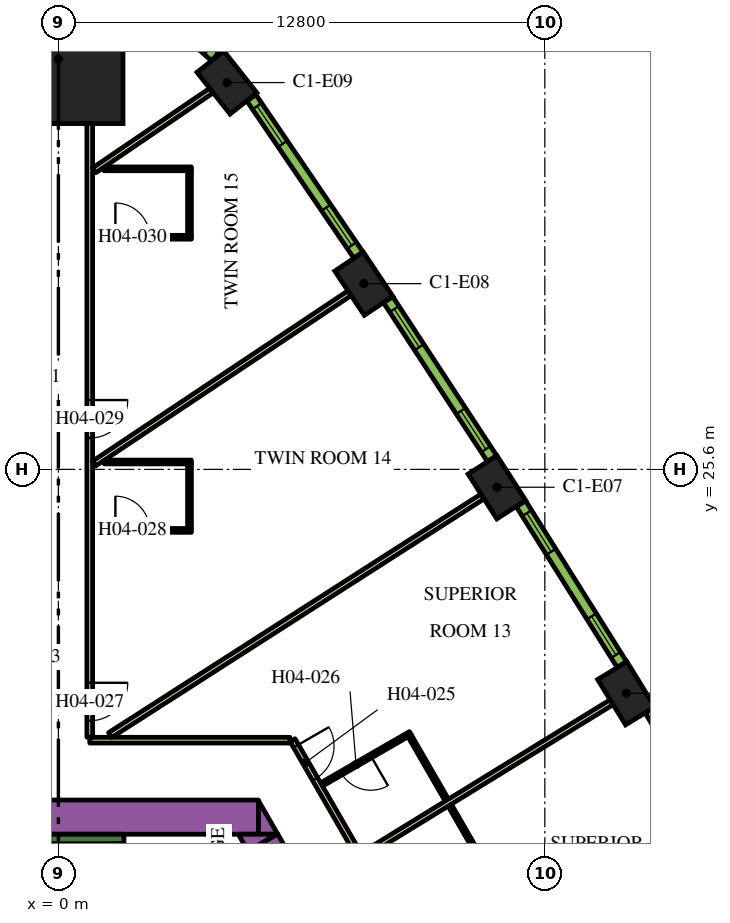
"""IFC4 building model, lengths in metres.
Left out: names, types, materials, properties, quantities, classifications, styles, units other than length and angle.
Written with IfcOpenShell. Run it as: python <this file> out.ifc"""

import sys

from ifc_helpers import new_model, si_unit, direction, frame, frame_2d, origin, origin_2d, place, context, subcontext, project, spatial, polyline, rectangle, outline, extrude, element, fill, save


model = new_model("IFC4")
c1 = context("Model", 3, precision=1e-05, world=origin(), true_north=direction((0.0, 1.0)))
c2 = subcontext(c1, "Body", "Model", "MODEL_VIEW")
j1 = project(units=[si_unit("LENGTHUNIT", "METRE"), si_unit("PLANEANGLEUNIT", "RADIAN")], contexts=[c1])
p1 = place(None, origin())
s1 = spatial("IfcSite", under=j1, at=p1, CompositionType="ELEMENT")
p2 = place(p1, origin())
s2 = spatial("IfcBuilding", under=s1, at=p2, CompositionType="ELEMENT")
p3 = place(p2, frame((0.0, 0.0, 62.7)))
s3 = spatial("IfcBuildingStorey", under=s2, at=p3, CompositionType="ELEMENT", Elevation=62.7)
p4 = place(p3, frame((0.0, 36.399, 0.0), z_axis=(0.0, 0.0, 1.0), x_axis=(0.0, 1.0, 0.0)))
e1 = element("IfcColumn", 1, at=p4, inside=s3, PredefinedType="COLUMN", context=c2, shape_type="SweptSolid", body=[
    extrude(rectangle(XDim=3.4, YDim=3.4, at=origin_2d()), origin(), (0.0, 0.0, 1.0), 3.9),
])
for number, where, z_axis, x_axis in (
    (2, (14.942, 19.71, 0.0), (0.0, 0.0, 1.0), (-0.524, 0.852, 0.0)),
    (3, (11.539, 25.131, 0.0), (0.0, 0.0, 1.0), (-0.539, 0.842, 0.0)),
    (4, (8.037, 30.487, 0.0), (0.0, 0.0, 1.0), (-0.555, 0.832, 0.0)),
    (5, (4.436, 35.778, 0.0), (0.0, 0.0, 1.0), (-0.62, 0.784, 0.0)),
):
    element("IfcColumn", number, at=place(p3, frame(where, z_axis=z_axis, x_axis=x_axis)), inside=s3, PredefinedType="COLUMN", context=c2, shape_type="SweptSolid", body=[
        extrude(rectangle(XDim=1.4, YDim=0.9, at=origin_2d()), origin(), (0.0, 0.0, 1.0), 3.9),
    ])
p5 = place(p3, frame((-4.224, 16.45, 0.0), z_axis=(0.0, 0.0, 1.0), x_axis=(1.0, 0.0, 0.0)))
e6 = element("IfcWall", 6, at=p5, inside=s3, PredefinedType="SOLIDWALL", context=c2, shape_type="SweptSolid", body=[
    extrude(rectangle(XDim=9.488, YDim=0.9, at=frame_2d((4.744, 0.0))), origin(), (0.0, 0.0, 1.0), 3.9),
])
p6 = place(p3, origin())
e7 = element("IfcWall", 7, at=p6, inside=s3, PredefinedType="SOLIDWALL", context=c2, shape_type="SweptSolid", body=[
    extrude(outline(polyline([(5.265, 16.0), (5.265, 16.88), (5.773, 16.0), (5.265, 16.0)])), origin(), (0.0, 0.0, 1.0), 3.9),
])
p7 = place(p3, frame((5.926, 14.836, 0.0), z_axis=(0.0, 0.0, 1.0), x_axis=(-0.500076735116, 0.865981096212, 0.0)))
e8 = element("IfcWall", 8, at=p7, inside=s3, PredefinedType="SOLIDWALL", context=c2, shape_type="SweptSolid", body=[
    extrude(rectangle(XDim=1.094, YDim=0.9, at=frame_2d((0.547, 0.0))), origin(), (0.0, 0.0, 1.0), 3.9),
])
e9 = element("IfcWall", 9, at=p6, inside=s3, PredefinedType="SOLIDWALL", context=c2, shape_type="SweptSolid", body=[
    extrude(outline(polyline([(4.734, 16.0), (5.75, 16.0), (4.988, 15.56), (4.734, 16.0)])), origin(), (0.0, 0.0, 1.0), 3.9),
])
p8 = place(p3, frame((-1.725, 15.875, 0.0), z_axis=(0.0, 0.0, 1.0), x_axis=(1.0, 0.0, 0.0)))
e10 = element("IfcWall", 10, at=p8, inside=s3, PredefinedType="SOLIDWALL", context=c2, shape_type="SweptSolid", body=[
    extrude(rectangle(XDim=3.45, YDim=0.25, at=frame_2d((1.725, 0.0))), origin(), (0.0, 0.0, 1.0), 3.9),
])
p9 = place(p3, frame((6.163, 18.475, 0.0), z_axis=(0.0, 0.0, 1.0), x_axis=(0.500001317485, -0.866024643133, 0.0)))
e11 = element("IfcWall", 11, at=p9, inside=s3, PredefinedType="PARTITIONING", context=c2, shape_type="SweptSolid", body=[
    extrude(rectangle(XDim=25.767, YDim=0.15, at=frame_2d((12.883, 0.0))), origin(), (0.0, 0.0, 1.0), 2.75),
])
p10 = place(p9, frame((21.138, 0.0, 0.0)))
e12 = element("IfcOpeningElement", 12, at=p10, cuts=e11, PredefinedType="OPENING", context=c2, shape_type="SweptSolid", body=[
    extrude(rectangle(XDim=1.0, YDim=2.1, at=frame_2d((0.5, 1.05))), frame((0.0, 0.085, 0.0), z_axis=(0.0, -1.0, 0.0), x_axis=(1.0, 0.0, 0.0)), (0.0, 0.0, 1.0), 0.17),
])
p11 = place(p9, frame((9.948, 0.0, 0.0)))
e13 = element("IfcOpeningElement", 13, at=p11, cuts=e11, PredefinedType="OPENING", context=c2, shape_type="SweptSolid", body=[
    extrude(rectangle(XDim=1.1, YDim=2.1, at=frame_2d((0.55, 1.05))), frame((0.0, 0.085, 0.0), z_axis=(0.0, -1.0, 0.0), x_axis=(1.0, 0.0, 0.0)), (0.0, 0.0, 1.0), 0.17),
])
p12 = place(p9, frame((8.641, 0.0, 0.0)))
e14 = element("IfcOpeningElement", 14, at=p12, cuts=e11, PredefinedType="OPENING", context=c2, shape_type="SweptSolid", body=[
    extrude(rectangle(XDim=1.0, YDim=2.1, at=frame_2d((0.5, 1.05))), frame((0.0, 0.085, 0.0), z_axis=(0.0, -1.0, 0.0), x_axis=(1.0, 0.0, 0.0)), (0.0, 0.0, 1.0), 0.17),
])
p13 = place(p9, frame((0.18, 0.0, 0.0)))
e15 = element("IfcOpeningElement", 15, at=p13, cuts=e11, PredefinedType="OPENING", context=c2, shape_type="SweptSolid", body=[
    extrude(rectangle(XDim=1.0, YDim=2.1, at=frame_2d((0.5, 1.05))), frame((0.0, 0.085, 0.0), z_axis=(0.0, -1.0, 0.0), x_axis=(1.0, 0.0, 0.0)), (0.0, 0.0, 1.0), 0.17),
])
p14 = place(p3, frame((0.825, 18.475, 0.0), z_axis=(0.0, 0.0, 1.0), x_axis=(1.0, 0.0, 0.0)))
e16 = element("IfcWall", 16, at=p14, inside=s3, PredefinedType="PARTITIONING", context=c2, shape_type="SweptSolid", body=[
    extrude(rectangle(XDim=5.268, YDim=0.15, at=frame_2d((2.634, 0.0))), origin(), (0.0, 0.0, 1.0), 2.75),
])
p15 = place(p3, frame((0.825, 34.699, 0.0), z_axis=(0.0, 0.0, 1.0), x_axis=(0.0, -1.0, 0.0)))
e17 = element("IfcWall", 17, at=p15, inside=s3, PredefinedType="PARTITIONING", context=c2, shape_type="SweptSolid", body=[
    extrude(rectangle(XDim=16.144, YDim=0.15, at=frame_2d((8.072, 0.0))), origin(), (0.0, 0.0, 1.0), 2.75),
])
p16 = place(p15, frame((14.714, 0.0, 0.0)))
e18 = element("IfcOpeningElement", 18, at=p16, cuts=e17, PredefinedType="OPENING", context=c2, shape_type="SweptSolid", body=[
    extrude(rectangle(XDim=1.0, YDim=2.1, at=frame_2d((0.5, 1.05))), frame((0.0, 0.085, 0.0), z_axis=(0.0, -1.0, 0.0), x_axis=(1.0, 0.0, 0.0)), (0.0, 0.0, 1.0), 0.17),
])
p17 = place(p15, frame((7.275, 0.0, 0.0)))
e19 = element("IfcOpeningElement", 19, at=p17, cuts=e17, PredefinedType="OPENING", context=c2, shape_type="SweptSolid", body=[
    extrude(rectangle(XDim=1.0, YDim=2.1, at=frame_2d((0.5, 1.05))), frame((0.0, 0.085, 0.0), z_axis=(0.0, -1.0, 0.0), x_axis=(1.0, 0.0, 0.0)), (0.0, 0.0, 1.0), 0.17),
])
p18 = place(p3, frame((7.662, 30.238, 0.0), z_axis=(0.0, 0.0, 1.0), x_axis=(-0.831882886825, -0.554951225431, 0.0)))
e20 = element("IfcWall", 20, at=p18, inside=s3, PredefinedType="PARTITIONING", context=c2, shape_type="SweptSolid", body=[
    extrude(rectangle(XDim=8.079, YDim=0.15, at=frame_2d((4.04, 0.0))), origin(), (0.0, 0.0, 1.0), 2.75),
])
p19 = place(p3, frame((11.16, 24.888, 0.0), z_axis=(0.0, 0.0, 1.0), x_axis=(-0.84199813156, -0.539480441211, 0.0)))
e21 = element("IfcWall", 21, at=p19, inside=s3, PredefinedType="PARTITIONING", context=c2, shape_type="SweptSolid", body=[
    extrude(rectangle(XDim=11.638, YDim=0.15, at=frame_2d((5.819, 0.0))), origin(), (0.0, 0.0, 1.0), 2.75),
])
p20 = place(p3, frame((4.028, 35.569, 0.0), z_axis=(0.0, 0.0, 1.0), x_axis=(-0.826730622998, -0.562597971021, 0.0)))
e22 = element("IfcWall", 22, at=p20, inside=s3, PredefinedType="PARTITIONING", context=c2, shape_type="SweptSolid", body=[
    extrude(rectangle(XDim=3.733, YDim=0.15, at=frame_2d((1.867, 0.0))), origin(), (0.0, 0.0, 1.0), 2.75),
])
p21 = place(p3, frame((14.558, 19.475, 0.0), z_axis=(0.0, 0.0, 1.0), x_axis=(-0.851829455142, -0.523819223925, 0.0)))
e23 = element("IfcWall", 23, at=p21, inside=s3, PredefinedType="PARTITIONING", context=c2, shape_type="SweptSolid", body=[
    extrude(rectangle(XDim=7.688, YDim=0.15, at=frame_2d((3.844, 0.0))), origin(), (0.0, 0.0, 1.0), 2.75),
])
p22 = place(p3, frame((11.342, 14.955, 0.0), z_axis=(0.0, 0.0, 1.0), x_axis=(-0.500008976872, 0.866020220923, 0.0)))
e24 = element("IfcWall", 24, at=p22, inside=s3, PredefinedType="PARTITIONING", context=c2, shape_type="SweptSolid", body=[
    extrude(rectangle(XDim=2.09, YDim=0.1, at=frame_2d((1.045, 0.0))), origin(), (0.0, 0.0, 1.0), 2.75),
])
p23 = place(p3, frame((9.262, 18.658, 0.0), z_axis=(0.0, 0.0, 1.0), x_axis=(-0.866019956843, -0.50000943426, 0.0)))
e25 = element("IfcWall", 25, at=p23, inside=s3, PredefinedType="PARTITIONING", context=c2, shape_type="SweptSolid", body=[
    extrude(rectangle(XDim=2.7, YDim=0.1, at=frame_2d((1.35, 0.0))), origin(), (0.0, 0.0, 1.0), 2.75),
])
p24 = place(p23, frame((1.2, 0.0, 0.0)))
e26 = element("IfcOpeningElement", 26, at=p24, cuts=e25, PredefinedType="OPENING", context=c2, shape_type="SweptSolid", body=[
    extrude(rectangle(XDim=0.9, YDim=2.1, at=frame_2d((0.45, 1.05))), frame((0.0, 0.06, 0.0), z_axis=(0.0, -1.0, 0.0), x_axis=(1.0, 0.0, 0.0)), (0.0, 0.0, 1.0), 0.12),
])
p25 = place(p3, frame((9.244, 18.589, 0.0), z_axis=(0.0, 0.0, 1.0), x_axis=(0.500043961785, -0.866000020948, 0.0)))
e27 = element("IfcWall", 27, at=p25, inside=s3, PredefinedType="PARTITIONING", context=c2, shape_type="SweptSolid", body=[
    extrude(rectangle(XDim=1.95, YDim=0.1, at=frame_2d((0.975, 0.0))), origin(), (0.0, 0.0, 1.0), 2.75),
])
p26 = place(p3, frame((0.9, 23.994, 0.0), z_axis=(0.0, 0.0, 1.0), x_axis=(1.0, 0.0, 0.0)))
e28 = element("IfcWall", 28, at=p26, inside=s3, PredefinedType="PARTITIONING", context=c2, shape_type="SweptSolid", body=[
    extrude(rectangle(XDim=2.6, YDim=0.1, at=frame_2d((1.3, 0.0))), origin(), (0.0, 0.0, 1.0), 2.75),
])
p27 = place(p26, frame((0.6, 0.0, 0.0)))
e29 = element("IfcOpeningElement", 29, at=p27, cuts=e28, PredefinedType="OPENING", context=c2, shape_type="SweptSolid", body=[
    extrude(rectangle(XDim=0.9, YDim=2.1, at=frame_2d((0.45, 1.05))), frame((0.0, 0.06, 0.0), z_axis=(0.0, -1.0, 0.0), x_axis=(1.0, 0.0, 0.0)), (0.0, 0.0, 1.0), 0.12),
])
p28 = place(p3, frame((3.45, 24.044, 0.0), z_axis=(0.0, 0.0, 1.0), x_axis=(0.0, 1.0, 0.0)))
e30 = element("IfcWall", 30, at=p28, inside=s3, PredefinedType="PARTITIONING", context=c2, shape_type="SweptSolid", body=[
    extrude(rectangle(XDim=1.7, YDim=0.1, at=frame_2d((0.85, 0.0))), origin(), (0.0, 0.0, 1.0), 2.75),
])
p29 = place(p3, frame((1.21, 25.794, 0.0), z_axis=(0.0, 0.0, 1.0), x_axis=(1.0, 0.0, 0.0)))
e31 = element("IfcWall", 31, at=p29, inside=s3, PredefinedType="PARTITIONING", context=c2, shape_type="SweptSolid", body=[
    extrude(rectangle(XDim=2.29, YDim=0.1, at=frame_2d((1.145, 0.0))), origin(), (0.0, 0.0, 1.0), 2.75),
])
p30 = place(p3, frame((0.9, 31.708, 0.0), z_axis=(0.0, 0.0, 1.0), x_axis=(1.0, 0.0, 0.0)))
e32 = element("IfcWall", 32, at=p30, inside=s3, PredefinedType="PARTITIONING", context=c2, shape_type="SweptSolid", body=[
    extrude(rectangle(XDim=2.6, YDim=0.1, at=frame_2d((1.3, 0.0))), origin(), (0.0, 0.0, 1.0), 2.75),
])
p31 = place(p30, frame((0.6, 0.0, 0.0)))
e33 = element("IfcOpeningElement", 33, at=p31, cuts=e32, PredefinedType="OPENING", context=c2, shape_type="SweptSolid", body=[
    extrude(rectangle(XDim=0.9, YDim=2.1, at=frame_2d((0.45, 1.05))), frame((0.0, 0.06, 0.0), z_axis=(0.0, -1.0, 0.0), x_axis=(1.0, 0.0, 0.0)), (0.0, 0.0, 1.0), 0.12),
])
p32 = place(p3, frame((3.45, 31.759, 0.0), z_axis=(0.0, 0.0, 1.0), x_axis=(0.0, 1.0, 0.0)))
e34 = element("IfcWall", 34, at=p32, inside=s3, PredefinedType="PARTITIONING", context=c2, shape_type="SweptSolid", body=[
    extrude(rectangle(XDim=1.7, YDim=0.1, at=frame_2d((0.85, 0.0))), origin(), (0.0, 0.0, 1.0), 2.75),
])
p33 = place(p3, frame((1.2, 33.509, 0.0), z_axis=(0.0, 0.0, 1.0), x_axis=(1.0, 0.0, 0.0)))
e35 = element("IfcWall", 35, at=p33, inside=s3, PredefinedType="PARTITIONING", context=c2, shape_type="SweptSolid", body=[
    extrude(rectangle(XDim=2.3, YDim=0.1, at=frame_2d((1.15, 0.0))), origin(), (0.0, 0.0, 1.0), 2.75),
])
p34 = place(p3, frame((18.143, 14.986, 0.0), z_axis=(0.0, 0.0, 1.0), x_axis=(-0.515938796285, 0.856625448191, 0.0)))
e36 = element("IfcWall", 36, at=p34, inside=s3, PredefinedType="SOLIDWALL", context=c2, shape_type="SweptSolid", body=[
    extrude(rectangle(XDim=4.998, YDim=0.29, at=frame_2d((2.499, 0.0))), origin(), (0.0, 0.0, 1.0), 3.65),
])
p35 = place(p34, frame((0.297, 0.0, 0.9)))
e37 = element("IfcOpeningElement", 37, at=p35, cuts=e36, PredefinedType="OPENING", context=c2, shape_type="SweptSolid", body=[
    extrude(rectangle(XDim=1.2, YDim=2.15, at=frame_2d((0.6, 1.075))), frame((0.0, 0.155, 0.0), z_axis=(0.0, -1.0, 0.0), x_axis=(1.0, 0.0, 0.0)), (0.0, 0.0, 1.0), 0.31),
])
p36 = place(p34, frame((3.501, 0.0, 0.9)))
e38 = element("IfcOpeningElement", 38, at=p36, cuts=e36, PredefinedType="OPENING", context=c2, shape_type="SweptSolid", body=[
    extrude(rectangle(XDim=1.2, YDim=2.15, at=frame_2d((0.6, 1.075))), frame((0.0, 0.155, 0.0), z_axis=(0.0, -1.0, 0.0), x_axis=(1.0, 0.0, 0.0)), (0.0, 0.0, 1.0), 0.31),
])
p37 = place(p3, frame((14.827, 20.466, 0.0), z_axis=(0.0, 0.0, 1.0), x_axis=(-0.531688286542, 0.846940119462, 0.0)))
e39 = element("IfcWall", 39, at=p37, inside=s3, PredefinedType="SOLIDWALL", context=c2, shape_type="SweptSolid", body=[
    extrude(rectangle(XDim=4.998, YDim=0.29, at=frame_2d((2.499, 0.0))), origin(), (0.0, 0.0, 1.0), 3.65),
])
p38 = place(p37, frame((0.297, 0.0, 0.9)))
e40 = element("IfcOpeningElement", 40, at=p38, cuts=e39, PredefinedType="OPENING", context=c2, shape_type="SweptSolid", body=[
    extrude(rectangle(XDim=1.2, YDim=2.15, at=frame_2d((0.6, 1.075))), frame((0.0, 0.155, 0.0), z_axis=(0.0, -1.0, 0.0), x_axis=(1.0, 0.0, 0.0)), (0.0, 0.0, 1.0), 0.31),
])
p39 = place(p37, frame((3.501, 0.0, 0.9)))
e41 = element("IfcOpeningElement", 41, at=p39, cuts=e39, PredefinedType="OPENING", context=c2, shape_type="SweptSolid", body=[
    extrude(rectangle(XDim=1.2, YDim=2.15, at=frame_2d((0.6, 1.075))), frame((0.0, 0.155, 0.0), z_axis=(0.0, -1.0, 0.0), x_axis=(1.0, 0.0, 0.0)), (0.0, 0.0, 1.0), 0.31),
])
p40 = place(p3, frame((11.411, 25.884, 0.0), z_axis=(0.0, 0.0, 1.0), x_axis=(-0.547204617628, 0.836998868845, 0.0)))
e42 = element("IfcWall", 42, at=p40, inside=s3, PredefinedType="SOLIDWALL", context=c2, shape_type="SweptSolid", body=[
    extrude(rectangle(XDim=4.998, YDim=0.29, at=frame_2d((2.499, 0.0))), origin(), (0.0, 0.0, 1.0), 3.65),
])
p41 = place(p40, frame((0.297, 0.0, 0.9)))
e43 = element("IfcOpeningElement", 43, at=p41, cuts=e42, PredefinedType="OPENING", context=c2, shape_type="SweptSolid", body=[
    extrude(rectangle(XDim=1.2, YDim=2.15, at=frame_2d((0.6, 1.075))), frame((0.0, 0.155, 0.0), z_axis=(0.0, -1.0, 0.0), x_axis=(1.0, 0.0, 0.0)), (0.0, 0.0, 1.0), 0.31),
])
p42 = place(p40, frame((3.501, 0.0, 0.9)))
e44 = element("IfcOpeningElement", 44, at=p42, cuts=e42, PredefinedType="OPENING", context=c2, shape_type="SweptSolid", body=[
    extrude(rectangle(XDim=1.2, YDim=2.15, at=frame_2d((0.6, 1.075))), frame((0.0, 0.155, 0.0), z_axis=(0.0, -1.0, 0.0), x_axis=(1.0, 0.0, 0.0)), (0.0, 0.0, 1.0), 0.31),
])
p43 = place(p3, frame((7.895, 31.238, 0.0), z_axis=(0.0, 0.0, 1.0), x_axis=(-0.562610153679, 0.826722332454, 0.0)))
e45 = element("IfcWall", 45, at=p43, inside=s3, PredefinedType="SOLIDWALL", context=c2, shape_type="SweptSolid", body=[
    extrude(rectangle(XDim=5.006, YDim=0.29, at=frame_2d((2.503, 0.0))), origin(), (0.0, 0.0, 1.0), 3.65),
])
p44 = place(p43, frame((0.31, 0.0, 0.9)))
e46 = element("IfcOpeningElement", 46, at=p44, cuts=e45, PredefinedType="OPENING", context=c2, shape_type="SweptSolid", body=[
    extrude(rectangle(XDim=1.2, YDim=2.15, at=frame_2d((0.6, 1.075))), frame((0.0, 0.155, 0.0), z_axis=(0.0, -1.0, 0.0), x_axis=(1.0, 0.0, 0.0)), (0.0, 0.0, 1.0), 0.31),
])
p45 = place(p43, frame((3.541, 0.0, 0.9)))
e47 = element("IfcOpeningElement", 47, at=p45, cuts=e45, PredefinedType="OPENING", context=c2, shape_type="SweptSolid", body=[
    extrude(rectangle(XDim=1.2, YDim=2.15, at=frame_2d((0.6, 1.075))), frame((0.0, 0.155, 0.0), z_axis=(0.0, -1.0, 0.0), x_axis=(1.0, 0.0, 0.0)), (0.0, 0.0, 1.0), 0.31),
])
p46 = place(p3, frame((4.125, 36.459, 0.0), z_axis=(0.0, 0.0, 1.0), x_axis=(-0.749812680302, 0.661650167731, 0.0)))
e48 = element("IfcWall", 48, at=p46, inside=s3, PredefinedType="SOLIDWALL", context=c2, shape_type="SweptSolid", body=[
    extrude(rectangle(XDim=1.415, YDim=0.29, at=frame_2d((0.708, 0.0))), origin(), (0.0, 0.0, 1.0), 3.65),
])
p47 = place(p46, frame((0.258, 0.0, 0.9)))
e49 = element("IfcOpeningElement", 49, at=p47, cuts=e48, PredefinedType="OPENING", context=c2, shape_type="SweptSolid", body=[
    extrude(rectangle(XDim=0.9, YDim=2.15, at=frame_2d((0.45, 1.075))), frame((0.0, 0.155, 0.0), z_axis=(0.0, -1.0, 0.0), x_axis=(1.0, 0.0, 0.0)), (0.0, 0.0, 1.0), 0.31),
])
p48 = place(p13, origin())
e50 = element("IfcDoor", 50, at=p48, inside=s3, OperationType="SINGLE_SWING_LEFT", PredefinedType="DOOR", context=c2, shape_type="SweptSolid", body=[
    extrude(rectangle(XDim=1.0, YDim=2.1, at=frame_2d((0.5, 1.05))), frame((0.0, 0.025, 0.0), z_axis=(0.0, -1.0, 0.0), x_axis=(1.0, 0.0, 0.0)), (0.0, 0.0, 1.0), 0.05),
])
fill(e15, e50)
p49 = place(p24, origin())
e51 = element("IfcDoor", 51, at=p49, inside=s3, OperationType="SINGLE_SWING_LEFT", PredefinedType="DOOR", context=c2, shape_type="SweptSolid", body=[
    extrude(rectangle(XDim=0.9, YDim=2.1, at=frame_2d((0.45, 1.05))), frame((0.0, 0.025, 0.0), z_axis=(0.0, -1.0, 0.0), x_axis=(1.0, 0.0, 0.0)), (0.0, 0.0, 1.0), 0.05),
])
fill(e26, e51)
p50 = place(p16, origin())
e52 = element("IfcDoor", 52, at=p50, inside=s3, OperationType="SINGLE_SWING_RIGHT", PredefinedType="DOOR", context=c2, shape_type="SweptSolid", body=[
    extrude(rectangle(XDim=1.0, YDim=2.1, at=frame_2d((0.5, 1.05))), frame((0.0, 0.025, 0.0), z_axis=(0.0, -1.0, 0.0), x_axis=(1.0, 0.0, 0.0)), (0.0, 0.0, 1.0), 0.05),
])
fill(e18, e52)
p51 = place(p27, origin())
e53 = element("IfcDoor", 53, at=p51, inside=s3, OperationType="SINGLE_SWING_LEFT", PredefinedType="DOOR", context=c2, shape_type="SweptSolid", body=[
    extrude(rectangle(XDim=0.9, YDim=2.1, at=frame_2d((0.45, 1.05))), frame((0.0, 0.025, 0.0), z_axis=(0.0, -1.0, 0.0), x_axis=(1.0, 0.0, 0.0)), (0.0, 0.0, 1.0), 0.05),
])
fill(e29, e53)
p52 = place(p17, origin())
e54 = element("IfcDoor", 54, at=p52, inside=s3, OperationType="SINGLE_SWING_RIGHT", PredefinedType="DOOR", context=c2, shape_type="SweptSolid", body=[
    extrude(rectangle(XDim=1.0, YDim=2.1, at=frame_2d((0.5, 1.05))), frame((0.0, 0.025, 0.0), z_axis=(0.0, -1.0, 0.0), x_axis=(1.0, 0.0, 0.0)), (0.0, 0.0, 1.0), 0.05),
])
fill(e19, e54)
p53 = place(p31, origin())
e55 = element("IfcDoor", 55, at=p53, inside=s3, OperationType="SINGLE_SWING_RIGHT", PredefinedType="DOOR", context=c2, shape_type="SweptSolid", body=[
    extrude(rectangle(XDim=0.9, YDim=2.1, at=frame_2d((0.45, 1.05))), frame((0.0, 0.025, 0.0), z_axis=(0.0, -1.0, 0.0), x_axis=(1.0, 0.0, 0.0)), (0.0, 0.0, 1.0), 0.05),
])
fill(e33, e55)
p54 = place(p38, origin())
e56 = element("IfcWindow", 56, at=p54, inside=s3, PartitioningType="DOUBLE_PANEL_VERTICAL", PredefinedType="WINDOW", context=c2, shape_type="SweptSolid", body=[
    extrude(rectangle(XDim=1.2, YDim=2.15, at=frame_2d((0.6, 1.075))), frame((0.0, 0.015, 0.0), z_axis=(0.0, -1.0, 0.0), x_axis=(1.0, 0.0, 0.0)), (0.0, 0.0, 1.0), 0.06),
])
fill(e40, e56)
p55 = place(p39, origin())
e57 = element("IfcWindow", 57, at=p55, inside=s3, PartitioningType="DOUBLE_PANEL_VERTICAL", PredefinedType="WINDOW", context=c2, shape_type="SweptSolid", body=[
    extrude(rectangle(XDim=1.2, YDim=2.15, at=frame_2d((0.6, 1.075))), frame((0.0, 0.015, 0.0), z_axis=(0.0, -1.0, 0.0), x_axis=(1.0, 0.0, 0.0)), (0.0, 0.0, 1.0), 0.06),
])
fill(e41, e57)
p56 = place(p41, origin())
e58 = element("IfcWindow", 58, at=p56, inside=s3, PartitioningType="DOUBLE_PANEL_VERTICAL", PredefinedType="WINDOW", context=c2, shape_type="SweptSolid", body=[
    extrude(rectangle(XDim=1.2, YDim=2.15, at=frame_2d((0.6, 1.075))), frame((0.0, 0.015, 0.0), z_axis=(0.0, -1.0, 0.0), x_axis=(1.0, 0.0, 0.0)), (0.0, 0.0, 1.0), 0.06),
])
fill(e43, e58)
p57 = place(p42, origin())
e59 = element("IfcWindow", 59, at=p57, inside=s3, PartitioningType="DOUBLE_PANEL_VERTICAL", PredefinedType="WINDOW", context=c2, shape_type="SweptSolid", body=[
    extrude(rectangle(XDim=1.2, YDim=2.15, at=frame_2d((0.6, 1.075))), frame((0.0, 0.015, 0.0), z_axis=(0.0, -1.0, 0.0), x_axis=(1.0, 0.0, 0.0)), (0.0, 0.0, 1.0), 0.06),
])
fill(e44, e59)
p58 = place(p44, origin())
e60 = element("IfcWindow", 60, at=p58, inside=s3, PartitioningType="DOUBLE_PANEL_VERTICAL", PredefinedType="WINDOW", context=c2, shape_type="SweptSolid", body=[
    extrude(rectangle(XDim=1.2, YDim=2.15, at=frame_2d((0.6, 1.075))), frame((0.0, 0.015, 0.0), z_axis=(0.0, -1.0, 0.0), x_axis=(1.0, 0.0, 0.0)), (0.0, 0.0, 1.0), 0.06),
])
fill(e46, e60)
p59 = place(p45, origin())
e61 = element("IfcWindow", 61, at=p59, inside=s3, PartitioningType="DOUBLE_PANEL_VERTICAL", PredefinedType="WINDOW", context=c2, shape_type="SweptSolid", body=[
    extrude(rectangle(XDim=1.2, YDim=2.15, at=frame_2d((0.6, 1.075))), frame((0.0, 0.015, 0.0), z_axis=(0.0, -1.0, 0.0), x_axis=(1.0, 0.0, 0.0)), (0.0, 0.0, 1.0), 0.06),
])
fill(e47, e61)
save(model, sys.argv[1])
